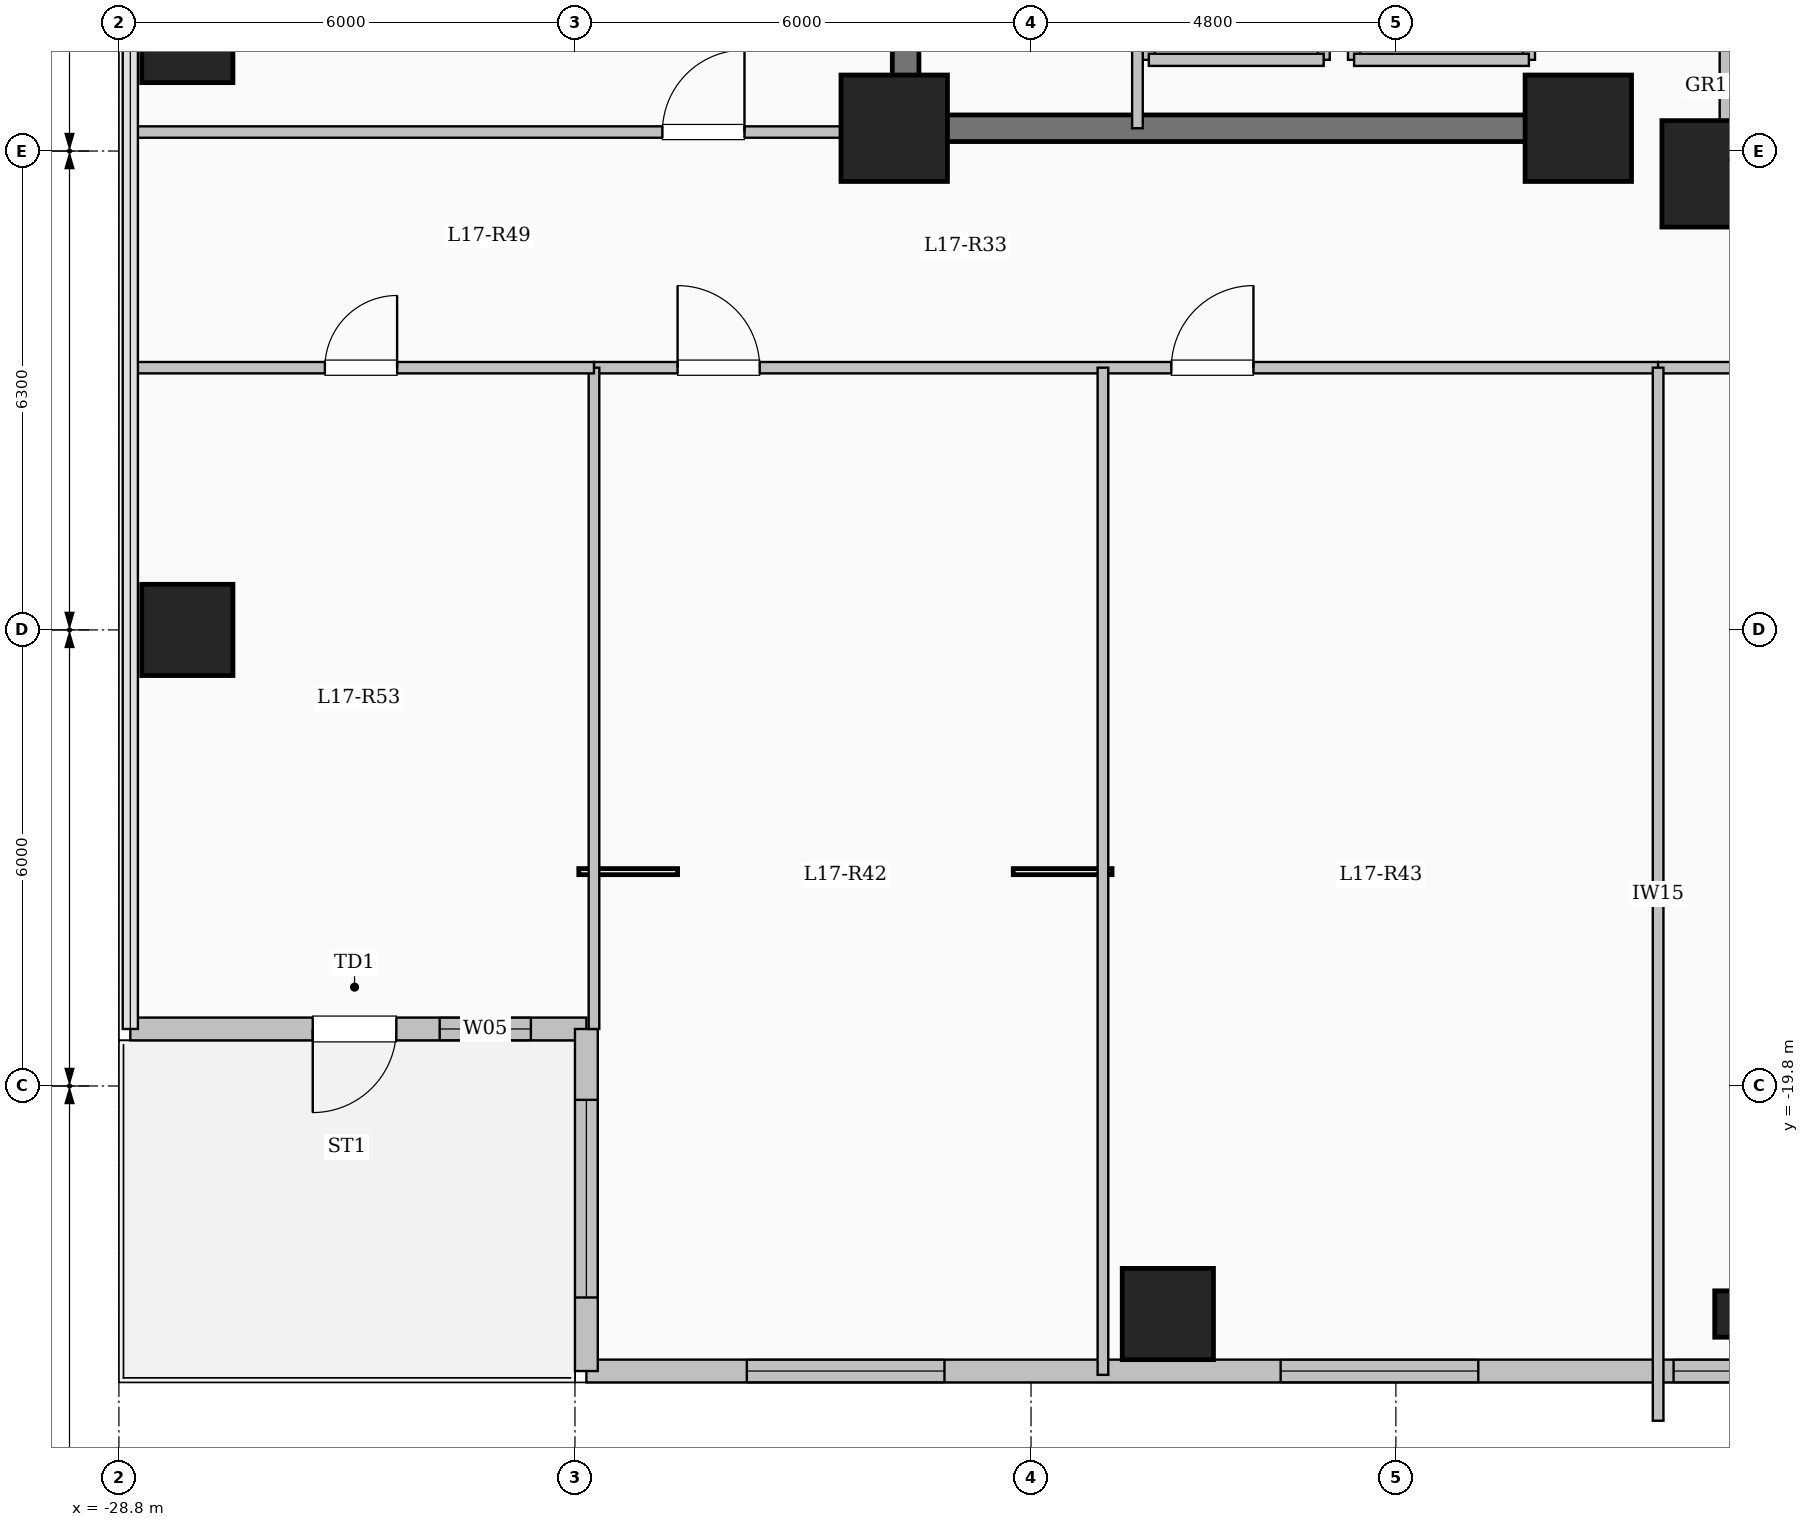
"""IFC4 building model, lengths in metres.
Left out: names, types, materials, properties, quantities, classifications, styles, units other than length and angle.
Written with IfcOpenShell. Run it as: python <this file> out.ifc"""

import sys

from ifc_helpers import new_model, si_unit, direction, frame, frame_2d, origin, origin_2d, place, context, subcontext, project, spatial, rectangle, hollow_circle, extrude, element, fill, save


model = new_model("IFC4")
c1 = context("Model", 3, precision=1e-05, world=origin(), true_north=direction((0.0, 1.0)))
c2 = subcontext(c1, "Body", "Model", "MODEL_VIEW")
j1 = project(units=[si_unit("LENGTHUNIT", "METRE"), si_unit("PLANEANGLEUNIT", "RADIAN")], contexts=[c1])
p1 = place(None, origin())
s1 = spatial("IfcSite", under=j1, at=p1, CompositionType="ELEMENT")
p2 = place(p1, origin())
s2 = spatial("IfcBuilding", under=s1, at=p2, CompositionType="ELEMENT")
p3 = place(p2, frame((0.0, 0.0, 64.2)))
s3 = spatial("IfcBuildingStorey", under=s2, at=p3, CompositionType="ELEMENT", Elevation=64.2)
for number, where, z_axis, x_axis in (
    (1, (-7.8, -7.8, 0.0), (0.0, 0.0, 1.0), (1.0, 0.0, 0.0)),
    (2, (-9.6, -7.2, 0.0), (0.0, 0.0, 1.0), (1.0, 0.0, 0.0)),
    (3, (-18.6, -7.2, 0.0), (0.0, 0.0, 1.0), (1.0, 0.0, 0.0)),
):
    element("IfcColumn", number, at=place(p3, frame(where, z_axis=z_axis, x_axis=x_axis)), inside=s3, PredefinedType="COLUMN", context=c2, shape_type="SweptSolid", body=[
        extrude(rectangle(XDim=1.4, YDim=1.4, at=origin_2d()), origin(), (0.0, 0.0, 1.0), 4.5),
    ])
p4 = place(p3, frame((-15.0, -22.8, 0.0), z_axis=(0.0, 0.0, 1.0), x_axis=(1.0, 0.0, 0.0)))
e4 = element("IfcColumn", 4, at=p4, inside=s3, PredefinedType="COLUMN", context=c2, shape_type="SweptSolid", body=[
    extrude(rectangle(XDim=1.2, YDim=1.2, at=origin_2d()), origin(), (0.0, 0.0, 1.0), 4.5),
])
p5 = place(p3, frame((-7.5, -22.8, 0.0), z_axis=(0.0, 0.0, 1.0), x_axis=(1.0, 0.0, 0.0)))
e5 = element("IfcColumn", 5, at=p5, inside=s3, PredefinedType="COLUMN", context=c2, shape_type="SweptSolid", body=[
    extrude(hollow_circle(Radius=0.305, WallThickness=0.025, at=origin_2d()), origin(), (0.0, 0.0, 1.0), 4.5),
])
for number, where, z_axis, x_axis in (
    (6, (-27.9, -13.8, 0.0), (0.0, 0.0, 1.0), (1.0, 0.0, 0.0)),
    (7, (-27.9, -6.0, 0.0), (0.0, 0.0, 1.0), (1.0, 0.0, 0.0)),
):
    element("IfcColumn", number, at=place(p3, frame(where, z_axis=z_axis, x_axis=x_axis)), inside=s3, PredefinedType="COLUMN", context=c2, shape_type="SweptSolid", body=[
        extrude(rectangle(XDim=1.2, YDim=1.2, at=origin_2d()), origin(), (0.0, 0.0, 1.0), 4.5),
    ])
p6 = place(p3, frame((-7.62, 7.62, 0.0), z_axis=(0.0, 0.0, 1.0), x_axis=(0.0, -1.0, 0.0)))
e8 = element("IfcWall", 8, at=p6, inside=s3, PredefinedType="SOLIDWALL", context=c2, shape_type="SweptSolid", body=[
    extrude(rectangle(XDim=15.24, YDim=0.24, at=frame_2d((7.62, 0.0))), origin(), (0.0, 0.0, 1.0), 4.2),
])
p7 = place(p6, frame((6.92, 0.0, 0.95)))
e9 = element("IfcOpeningElement", 9, at=p7, cuts=e8, PredefinedType="OPENING", context=c2, shape_type="SweptSolid", body=[
    extrude(rectangle(XDim=1.4, YDim=1.5, at=frame_2d((0.7, 0.75))), frame((0.0, 0.13, 0.0), z_axis=(0.0, -1.0, 0.0), x_axis=(1.0, 0.0, 0.0)), (0.0, 0.0, 1.0), 0.26),
])
p8 = place(p3, frame((-22.65, -19.05, 0.0), z_axis=(0.0, 0.0, 1.0), x_axis=(-1.0, 0.0, 0.0)))
e10 = element("IfcWall", 10, at=p8, inside=s3, PredefinedType="SOLIDWALL", context=c2, shape_type="SweptSolid", body=[
    extrude(rectangle(XDim=6.0, YDim=0.3, at=frame_2d((3.0, 0.0))), origin(), (0.0, 0.0, 1.0), 4.2),
])
p9 = place(p8, frame((2.5, 0.0, 0.0)))
e11 = element("IfcOpeningElement", 11, at=p9, cuts=e10, PredefinedType="OPENING", context=c2, shape_type="SweptSolid", body=[
    extrude(rectangle(XDim=1.1, YDim=2.2, at=frame_2d((0.55, 1.1))), frame((0.0, 0.16, 0.0), z_axis=(0.0, -1.0, 0.0), x_axis=(1.0, 0.0, 0.0)), (0.0, 0.0, 1.0), 0.32),
])
p10 = place(p8, frame((0.73, 0.0, 0.95)))
e12 = element("IfcOpeningElement", 12, at=p10, cuts=e10, PredefinedType="OPENING", context=c2, shape_type="SweptSolid", body=[
    extrude(rectangle(XDim=1.2, YDim=1.5, at=frame_2d((0.6, 0.75))), frame((0.0, 0.16, 0.0), z_axis=(0.0, -1.0, 0.0), x_axis=(1.0, 0.0, 0.0)), (0.0, 0.0, 1.0), 0.32),
])
p11 = place(p3, frame((-7.35, -23.55, 0.0), z_axis=(0.0, 0.0, 1.0), x_axis=(-1.0, 0.0, 0.0)))
e13 = element("IfcWall", 13, at=p11, inside=s3, PredefinedType="SOLIDWALL", context=c2, shape_type="SweptSolid", body=[
    extrude(rectangle(XDim=15.3, YDim=0.3, at=frame_2d((7.65, 0.0))), origin(), (0.0, 0.0, 1.0), 4.2),
])
p12 = place(p11, frame((0.147, 0.0, 0.95)))
e14 = element("IfcOpeningElement", 14, at=p12, cuts=e13, PredefinedType="OPENING", context=c2, shape_type="SweptSolid", body=[
    extrude(rectangle(XDim=0.85, YDim=1.5, at=frame_2d((0.425, 0.75))), frame((0.0, 0.16, 0.0), z_axis=(0.0, -1.0, 0.0), x_axis=(1.0, 0.0, 0.0)), (0.0, 0.0, 1.0), 0.32),
])
p13 = place(p11, frame((3.566, 0.0, 0.85)))
e15 = element("IfcOpeningElement", 15, at=p13, cuts=e13, PredefinedType="OPENING", context=c2, shape_type="SweptSolid", body=[
    extrude(rectangle(XDim=2.6, YDim=2.4, at=frame_2d((1.3, 1.2))), frame((0.0, 0.16, 0.0), z_axis=(0.0, -1.0, 0.0), x_axis=(1.0, 0.0, 0.0)), (0.0, 0.0, 1.0), 0.32),
])
p14 = place(p11, frame((10.589, 0.0, 0.85)))
e16 = element("IfcOpeningElement", 16, at=p14, cuts=e13, PredefinedType="OPENING", context=c2, shape_type="SweptSolid", body=[
    extrude(rectangle(XDim=2.6, YDim=2.4, at=frame_2d((1.3, 1.2))), frame((0.0, 0.16, 0.0), z_axis=(0.0, -1.0, 0.0), x_axis=(1.0, 0.0, 0.0)), (0.0, 0.0, 1.0), 0.32),
])
p15 = place(p3, frame((-22.65, -23.55, 0.0), z_axis=(0.0, 0.0, 1.0), x_axis=(0.0, 1.0, 0.0)))
e17 = element("IfcWall", 17, at=p15, inside=s3, PredefinedType="SOLIDWALL", context=c2, shape_type="SweptSolid", body=[
    extrude(rectangle(XDim=4.5, YDim=0.3, at=frame_2d((2.25, 0.0))), origin(), (0.0, 0.0, 1.0), 4.2),
])
p16 = place(p15, frame((0.968, 0.0, 0.85)))
e18 = element("IfcOpeningElement", 18, at=p16, cuts=e17, PredefinedType="OPENING", context=c2, shape_type="SweptSolid", body=[
    extrude(rectangle(XDim=2.6, YDim=2.4, at=frame_2d((1.3, 1.2))), frame((0.0, 0.16, 0.0), z_axis=(0.0, -1.0, 0.0), x_axis=(1.0, 0.0, 0.0)), (0.0, 0.0, 1.0), 0.32),
])
p17 = place(p3, frame((-12.55, -6.3, 0.0), z_axis=(0.0, 0.0, 1.0), x_axis=(0.0, 1.0, 0.0)))
e19 = element("IfcWall", 19, at=p17, inside=s3, PredefinedType="SOLIDWALL", context=c2, shape_type="SweptSolid", body=[
    extrude(rectangle(XDim=2.6, YDim=0.16, at=frame_2d((1.3, 0.0))), origin(), (0.0, 0.0, 1.0), 4.2),
])
p18 = place(p3, frame((-10.25, -6.3, 0.0), z_axis=(0.0, 0.0, 1.0), x_axis=(0.0, 1.0, 0.0)))
e20 = element("IfcWall", 20, at=p18, inside=s3, PredefinedType="SOLIDWALL", context=c2, shape_type="SweptSolid", body=[
    extrude(rectangle(XDim=2.6, YDim=0.16, at=frame_2d((1.3, 0.0))), origin(), (0.0, 0.0, 1.0), 4.2),
])
p19 = place(p18, frame((0.75, 0.0, 0.0)))
e21 = element("IfcOpeningElement", 21, at=p19, cuts=e20, PredefinedType="OPENING", context=c2, shape_type="SweptSolid", body=[
    extrude(rectangle(XDim=1.1, YDim=2.15, at=frame_2d((0.55, 1.075))), frame((0.0, 0.09, 0.0), z_axis=(0.0, -1.0, 0.0), x_axis=(1.0, 0.0, 0.0)), (0.0, 0.0, 1.0), 0.18),
])
p20 = place(p3, frame((-12.55, -6.3, 0.0), z_axis=(0.0, 0.0, 1.0), x_axis=(1.0, 0.0, 0.0)))
e22 = element("IfcWall", 22, at=p20, inside=s3, PredefinedType="SOLIDWALL", context=c2, shape_type="SweptSolid", body=[
    extrude(rectangle(XDim=2.3, YDim=0.16, at=frame_2d((1.15, 0.0))), origin(), (0.0, 0.0, 1.0), 4.2),
])
for number, where, z_axis, x_axis in (
    (23, (-15.25, -6.3, 0.0), (0.0, 0.0, 1.0), (0.0, 1.0, 0.0)),
    (24, (-12.95, -6.3, 0.0), (0.0, 0.0, 1.0), (0.0, 1.0, 0.0)),
):
    element("IfcWall", number, at=place(p3, frame(where, z_axis=z_axis, x_axis=x_axis)), inside=s3, PredefinedType="SOLIDWALL", context=c2, shape_type="SweptSolid", body=[
        extrude(rectangle(XDim=2.6, YDim=0.16, at=frame_2d((1.3, 0.0))), origin(), (0.0, 0.0, 1.0), 4.2),
    ])
p21 = place(p3, frame((-15.25, -6.3, 0.0), z_axis=(0.0, 0.0, 1.0), x_axis=(1.0, 0.0, 0.0)))
e25 = element("IfcWall", 25, at=p21, inside=s3, PredefinedType="SOLIDWALL", context=c2, shape_type="SweptSolid", body=[
    extrude(rectangle(XDim=2.3, YDim=0.16, at=frame_2d((1.15, 0.0))), origin(), (0.0, 0.0, 1.0), 4.2),
])
p22 = place(p3, frame((-18.45, -7.375, 0.0), z_axis=(0.0, 0.0, 1.0), x_axis=(0.0, 1.0, 0.0)))
e26 = element("IfcWall", 26, at=p22, inside=s3, PredefinedType="SHEAR", context=c2, shape_type="SweptSolid", body=[
    extrude(rectangle(XDim=14.05, YDim=0.35, at=frame_2d((7.025, 0.0))), origin(), (0.0, 0.0, 1.0), 4.5),
])
p23 = place(p3, frame((-18.625, -7.2, 0.0), z_axis=(0.0, 0.0, 1.0), x_axis=(1.0, 0.0, 0.0)))
e27 = element("IfcWall", 27, at=p23, inside=s3, PredefinedType="SHEAR", context=c2, shape_type="SweptSolid", body=[
    extrude(rectangle(XDim=8.55, YDim=0.35, at=frame_2d((4.275, 0.0))), origin(), (0.0, 0.0, 1.0), 4.5),
])
p24 = place(p3, frame((-15.4, -7.2, 0.0), z_axis=(0.0, 0.0, 1.0), x_axis=(0.0, 1.0, 0.0)))
e28 = element("IfcWall", 28, at=p24, inside=s3, PredefinedType="PARTITIONING", context=c2, shape_type="SweptSolid", body=[
    extrude(rectangle(XDim=10.45, YDim=0.14, at=frame_2d((5.225, 0.0))), origin(), (0.0, 0.0, 1.0), 4.2),
])
p25 = place(p24, frame((9.25, 0.0, 0.0)))
e29 = element("IfcOpeningElement", 29, at=p25, cuts=e28, PredefinedType="OPENING", context=c2, shape_type="SweptSolid", body=[
    extrude(rectangle(XDim=0.9, YDim=2.08, at=frame_2d((0.45, 1.04))), frame((0.0, 0.08, 0.0), z_axis=(0.0, -1.0, 0.0), x_axis=(1.0, 0.0, 0.0)), (0.0, 0.0, 1.0), 0.16),
])
p26 = place(p3, frame((-22.55, -10.35, 0.0), z_axis=(0.0, 0.0, 1.0), x_axis=(1.0, 0.0, 0.0)))
e30 = element("IfcWall", 30, at=p26, inside=s3, PredefinedType="PARTITIONING", context=c2, shape_type="SweptSolid", body=[
    extrude(rectangle(XDim=14.0, YDim=0.15, at=frame_2d((7.0, 0.0))), origin(), (0.0, 0.0, 1.0), 4.2),
])
p27 = place(p26, frame((1.1, 0.0, 0.0)))
e31 = element("IfcOpeningElement", 31, at=p27, cuts=e30, PredefinedType="OPENING", context=c2, shape_type="SweptSolid", body=[
    extrude(rectangle(XDim=1.08, YDim=2.15, at=frame_2d((0.54, 1.075))), frame((0.0, 0.085, 0.0), z_axis=(0.0, -1.0, 0.0), x_axis=(1.0, 0.0, 0.0)), (0.0, 0.0, 1.0), 0.17),
])
p28 = place(p26, frame((7.596, 0.0, 0.0)))
e32 = element("IfcOpeningElement", 32, at=p28, cuts=e30, PredefinedType="OPENING", context=c2, shape_type="SweptSolid", body=[
    extrude(rectangle(XDim=1.08, YDim=2.15, at=frame_2d((0.54, 1.075))), frame((0.0, 0.085, 0.0), z_axis=(0.0, -1.0, 0.0), x_axis=(1.0, 0.0, 0.0)), (0.0, 0.0, 1.0), 0.17),
])
p29 = place(p3, frame((-8.55, -10.35, 0.0), z_axis=(0.0, 0.0, 1.0), x_axis=(1.0, 0.0, 0.0)))
e33 = element("IfcWall", 33, at=p29, inside=s3, PredefinedType="PARTITIONING", context=c2, shape_type="SweptSolid", body=[
    extrude(rectangle(XDim=17.1, YDim=0.15, at=frame_2d((8.55, 0.0))), origin(), (0.0, 0.0, 1.0), 4.2),
])
p30 = place(p29, frame((3.5, 0.0, 0.0)))
e34 = element("IfcOpeningElement", 34, at=p30, cuts=e33, PredefinedType="OPENING", context=c2, shape_type="SweptSolid", body=[
    extrude(rectangle(XDim=1.2, YDim=2.15, at=frame_2d((0.6, 1.075))), frame((0.0, 0.085, 0.0), z_axis=(0.0, -1.0, 0.0), x_axis=(1.0, 0.0, 0.0)), (0.0, 0.0, 1.0), 0.17),
])
p31 = place(p3, frame((-15.854, -23.6, 0.0), z_axis=(0.0, 0.0, 1.0), x_axis=(0.0, 1.0, 0.0)))
e35 = element("IfcWall", 35, at=p31, inside=s3, PredefinedType="PARTITIONING", context=c2, shape_type="SweptSolid", body=[
    extrude(rectangle(XDim=13.25, YDim=0.14, at=frame_2d((6.625, 0.0))), origin(), (0.0, 0.0, 1.0), 4.2),
])
p32 = place(p3, frame((-8.55, -24.204, 0.0), z_axis=(0.0, 0.0, 1.0), x_axis=(0.0, 1.0, 0.0)))
e36 = element("IfcWall", 36, at=p32, inside=s3, PredefinedType="PARTITIONING", context=c2, shape_type="SweptSolid", body=[
    extrude(rectangle(XDim=13.854, YDim=0.14, at=frame_2d((6.927, 0.0))), origin(), (0.0, 0.0, 1.0), 4.2),
])
p33 = place(p3, frame((-28.68, -7.25, 0.0), z_axis=(0.0, 0.0, 1.0), x_axis=(1.0, 0.0, 0.0)))
e37 = element("IfcWall", 37, at=p33, inside=s3, PredefinedType="PARTITIONING", context=c2, shape_type="SweptSolid", body=[
    extrude(rectangle(XDim=10.23, YDim=0.15, at=frame_2d((5.115, 0.0))), origin(), (0.0, 0.0, 1.0), 4.2),
])
p34 = place(p33, frame((7.03, 0.0, 0.0)))
e38 = element("IfcOpeningElement", 38, at=p34, cuts=e37, PredefinedType="OPENING", context=c2, shape_type="SweptSolid", body=[
    extrude(rectangle(XDim=1.08, YDim=2.15, at=frame_2d((0.54, 1.075))), frame((0.0, 0.085, 0.0), z_axis=(0.0, -1.0, 0.0), x_axis=(1.0, 0.0, 0.0)), (0.0, 0.0, 1.0), 0.17),
])
p35 = place(p3, frame((-22.55, -19.05, 0.0), z_axis=(0.0, 0.0, 1.0), x_axis=(0.0, 1.0, 0.0)))
e39 = element("IfcWall", 39, at=p35, inside=s3, PredefinedType="PARTITIONING", context=c2, shape_type="SweptSolid", body=[
    extrude(rectangle(XDim=8.7, YDim=0.14, at=frame_2d((4.35, 0.0))), origin(), (0.0, 0.0, 1.0), 4.2),
])
p36 = place(p3, frame((-28.68, -10.35, 0.0), z_axis=(0.0, 0.0, 1.0), x_axis=(1.0, 0.0, 0.0)))
e40 = element("IfcWall", 40, at=p36, inside=s3, PredefinedType="PARTITIONING", context=c2, shape_type="SweptSolid", body=[
    extrude(rectangle(XDim=6.13, YDim=0.15, at=frame_2d((3.065, 0.0))), origin(), (0.0, 0.0, 1.0), 4.2),
])
p37 = place(p36, frame((2.59, 0.0, 0.0)))
e41 = element("IfcOpeningElement", 41, at=p37, cuts=e40, PredefinedType="OPENING", context=c2, shape_type="SweptSolid", body=[
    extrude(rectangle(XDim=0.95, YDim=2.15, at=frame_2d((0.475, 1.075))), frame((0.0, 0.085, 0.0), z_axis=(0.0, -1.0, 0.0), x_axis=(1.0, 0.0, 0.0)), (0.0, 0.0, 1.0), 0.17),
])
p38 = place(p9, origin())
e42 = element("IfcDoor", 42, at=p38, inside=s3, OperationType="SINGLE_SWING_RIGHT", PredefinedType="DOOR", context=c2, shape_type="SweptSolid", body=[
    extrude(rectangle(XDim=1.1, YDim=2.2, at=frame_2d((0.55, 1.1))), frame((0.0, 0.025, 0.0), z_axis=(0.0, -1.0, 0.0), x_axis=(1.0, 0.0, 0.0)), (0.0, 0.0, 1.0), 0.05),
])
fill(e11, e42)
p39 = place(p10, origin())
e43 = element("IfcWindow", 43, at=p39, inside=s3, PartitioningType="SINGLE_PANEL", PredefinedType="WINDOW", context=c2, shape_type="SweptSolid", body=[
    extrude(rectangle(XDim=1.2, YDim=1.5, at=frame_2d((0.6, 0.75))), frame((0.0, 0.03, 0.0), z_axis=(0.0, -1.0, 0.0), x_axis=(1.0, 0.0, 0.0)), (0.0, 0.0, 1.0), 0.06),
])
fill(e12, e43)
p40 = place(p12, origin())
e44 = element("IfcWindow", 44, at=p40, inside=s3, PartitioningType="SINGLE_PANEL", PredefinedType="WINDOW", context=c2, shape_type="SweptSolid", body=[
    extrude(rectangle(XDim=0.85, YDim=1.5, at=frame_2d((0.425, 0.75))), frame((0.0, 0.03, 0.0), z_axis=(0.0, -1.0, 0.0), x_axis=(1.0, 0.0, 0.0)), (0.0, 0.0, 1.0), 0.06),
])
fill(e14, e44)
p41 = place(p13, origin())
e45 = element("IfcWindow", 45, at=p41, inside=s3, PartitioningType="SINGLE_PANEL", PredefinedType="WINDOW", context=c2, shape_type="SweptSolid", body=[
    extrude(rectangle(XDim=2.6, YDim=2.4, at=frame_2d((1.3, 1.2))), frame((0.0, 0.03, 0.0), z_axis=(0.0, -1.0, 0.0), x_axis=(1.0, 0.0, 0.0)), (0.0, 0.0, 1.0), 0.06),
])
fill(e15, e45)
p42 = place(p14, origin())
e46 = element("IfcWindow", 46, at=p42, inside=s3, PartitioningType="SINGLE_PANEL", PredefinedType="WINDOW", context=c2, shape_type="SweptSolid", body=[
    extrude(rectangle(XDim=2.6, YDim=2.4, at=frame_2d((1.3, 1.2))), frame((0.0, 0.03, 0.0), z_axis=(0.0, -1.0, 0.0), x_axis=(1.0, 0.0, 0.0)), (0.0, 0.0, 1.0), 0.06),
])
fill(e16, e46)
p43 = place(p16, origin())
e47 = element("IfcWindow", 47, at=p43, inside=s3, PartitioningType="SINGLE_PANEL", PredefinedType="WINDOW", context=c2, shape_type="SweptSolid", body=[
    extrude(rectangle(XDim=2.6, YDim=2.4, at=frame_2d((1.3, 1.2))), frame((0.0, 0.03, 0.0), z_axis=(0.0, -1.0, 0.0), x_axis=(1.0, 0.0, 0.0)), (0.0, 0.0, 1.0), 0.06),
])
fill(e18, e47)
p44 = place(p27, origin())
e48 = element("IfcDoor", 48, at=p44, inside=s3, OperationType="SINGLE_SWING_LEFT", PredefinedType="DOOR", context=c2, shape_type="SweptSolid", body=[
    extrude(rectangle(XDim=1.08, YDim=2.15, at=frame_2d((0.54, 1.075))), frame((0.0, 0.025, 0.0), z_axis=(0.0, -1.0, 0.0), x_axis=(1.0, 0.0, 0.0)), (0.0, 0.0, 1.0), 0.05),
])
fill(e31, e48)
p45 = place(p28, origin())
e49 = element("IfcDoor", 49, at=p45, inside=s3, OperationType="SINGLE_SWING_RIGHT", PredefinedType="DOOR", context=c2, shape_type="SweptSolid", body=[
    extrude(rectangle(XDim=1.08, YDim=2.15, at=frame_2d((0.54, 1.075))), frame((0.0, 0.025, 0.0), z_axis=(0.0, -1.0, 0.0), x_axis=(1.0, 0.0, 0.0)), (0.0, 0.0, 1.0), 0.05),
])
fill(e32, e49)
p46 = place(p37, origin())
e50 = element("IfcDoor", 50, at=p46, inside=s3, OperationType="SINGLE_SWING_RIGHT", PredefinedType="DOOR", context=c2, shape_type="SweptSolid", body=[
    extrude(rectangle(XDim=0.95, YDim=2.15, at=frame_2d((0.475, 1.075))), frame((0.0, 0.025, 0.0), z_axis=(0.0, -1.0, 0.0), x_axis=(1.0, 0.0, 0.0)), (0.0, 0.0, 1.0), 0.05),
])
fill(e41, e50)
p47 = place(p34, origin())
e51 = element("IfcDoor", 51, at=p47, inside=s3, OperationType="SINGLE_SWING_RIGHT", PredefinedType="DOOR", context=c2, shape_type="SweptSolid", body=[
    extrude(rectangle(XDim=1.08, YDim=2.15, at=frame_2d((0.54, 1.075))), frame((0.0, 0.025, 0.0), z_axis=(0.0, -1.0, 0.0), x_axis=(1.0, 0.0, 0.0)), (0.0, 0.0, 1.0), 0.05),
])
fill(e38, e51)
save(model, sys.argv[1])
